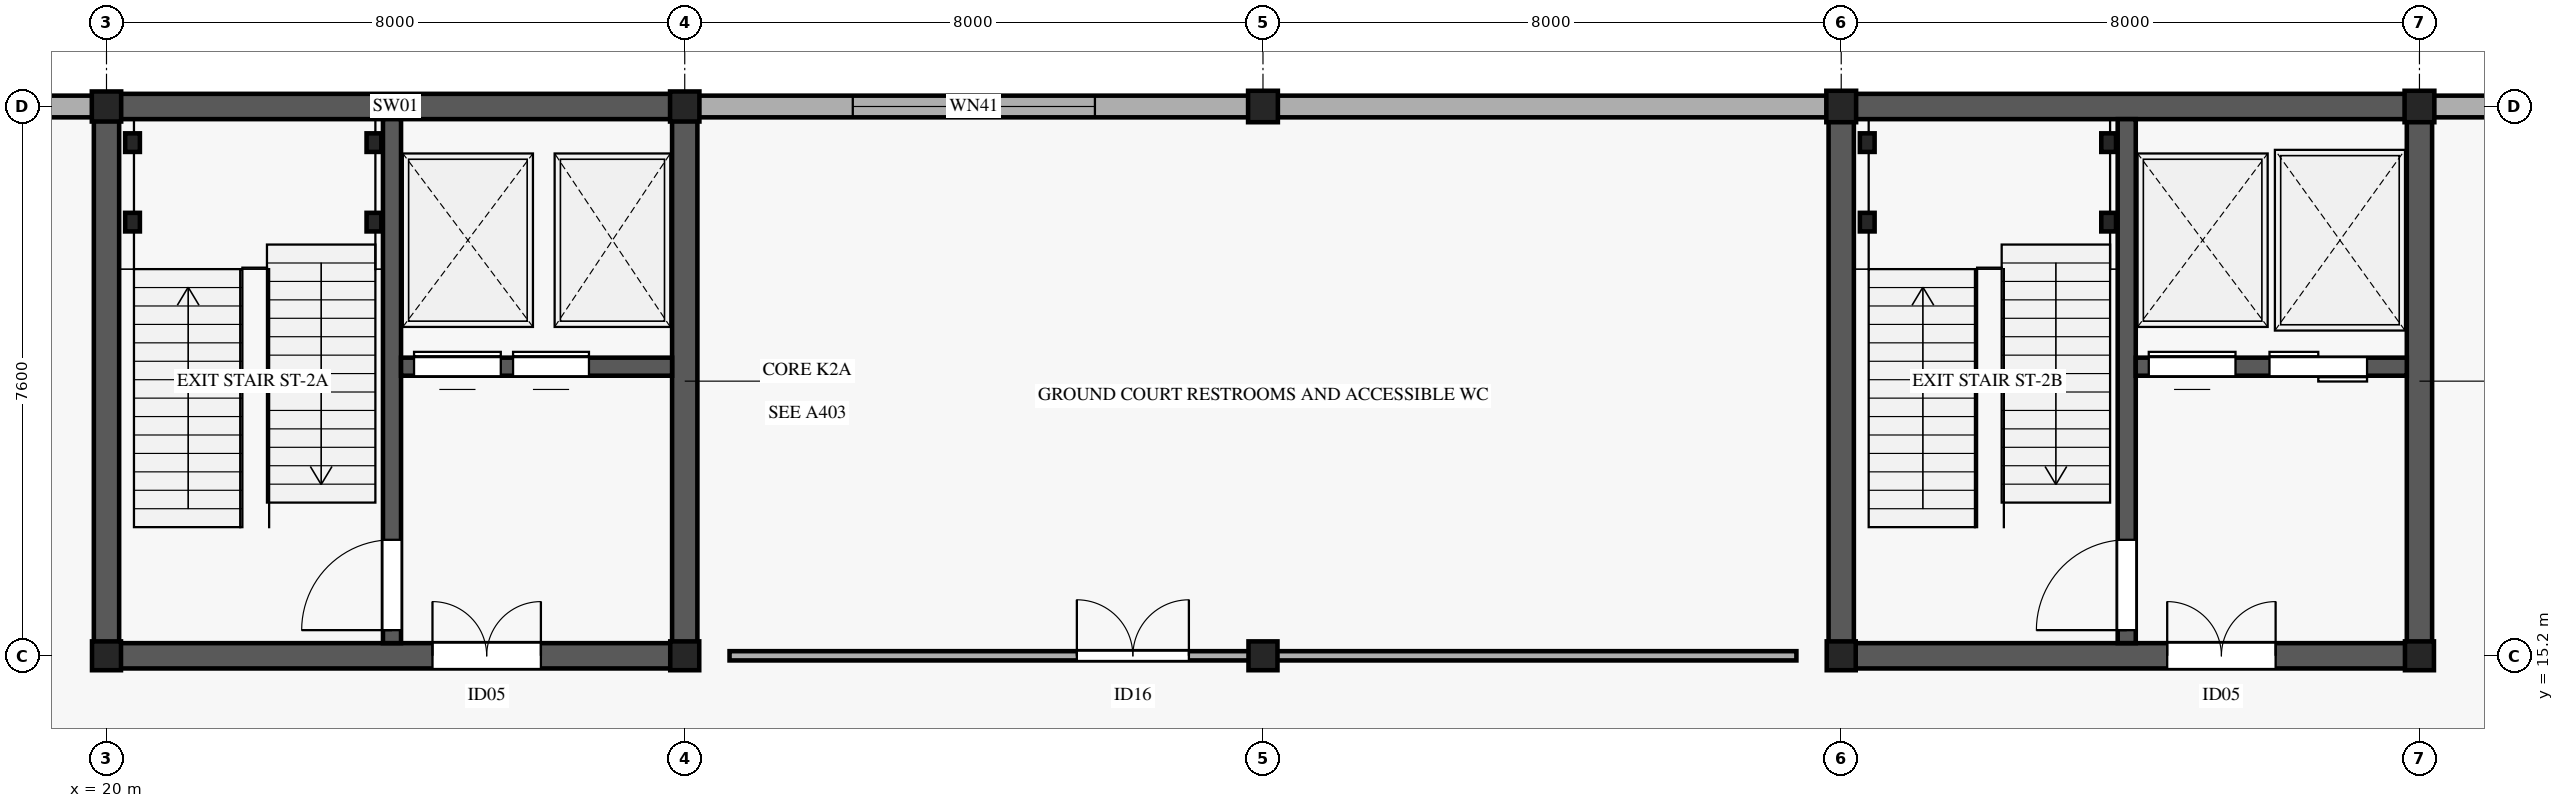
"""IFC4 building model, lengths in metres.
Left out: names, types, materials, properties, quantities, classifications, styles, units other than length and angle.
Written with IfcOpenShell. Run it as: python <this file> out.ifc"""

import sys

from ifc_helpers import new_model, si_unit, direction, frame, frame_2d, origin, origin_2d, place, context, subcontext, project, spatial, rectangle, i_section, extrude, element, fill, save


model = new_model("IFC4")
c1 = context("Model", 3, precision=1e-05, world=origin(), true_north=direction((0.0, 1.0)))
c2 = subcontext(c1, "Body", "Model", "MODEL_VIEW")
j1 = project(units=[si_unit("LENGTHUNIT", "METRE"), si_unit("PLANEANGLEUNIT", "RADIAN")], contexts=[c1])
p1 = place(None, origin())
s1 = spatial("IfcSite", under=j1, at=p1, CompositionType="ELEMENT")
p2 = place(p1, origin())
s2 = spatial("IfcBuilding", under=s1, at=p2, CompositionType="ELEMENT")
p3 = place(p2, origin())
s3 = spatial("IfcBuildingStorey", under=s2, at=p3, CompositionType="ELEMENT", Elevation=0.0)
p4 = place(p3, frame((20.0, 15.2, 0.0), z_axis=(0.0, 0.0, 1.0), x_axis=(1.0, 0.0, 0.0)))
e1 = element("IfcColumn", 1, at=p4, inside=s3, PredefinedType="COLUMN", context=c2, shape_type="SweptSolid", body=[
    extrude(i_section(OverallWidth=0.401, OverallDepth=0.399, WebThickness=0.025, FlangeThickness=0.04, FilletRadius=0.015, at=origin_2d()), origin(), (0.0, 0.0, 1.0), 5.185),
])
p5 = place(p3, frame((20.0, 22.8, 0.0), z_axis=(0.0, 0.0, 1.0), x_axis=(1.0, 0.0, 0.0)))
e2 = element("IfcColumn", 2, at=p5, inside=s3, PredefinedType="COLUMN", context=c2, shape_type="SweptSolid", body=[
    extrude(i_section(OverallWidth=0.406, OverallDepth=0.416, WebThickness=0.03, FlangeThickness=0.048, FilletRadius=0.015, at=origin_2d()), origin(), (0.0, 0.0, 1.0), 5.185),
])
p6 = place(p3, frame((28.0, 15.2, 0.0), z_axis=(0.0, 0.0, 1.0), x_axis=(1.0, 0.0, 0.0)))
e3 = element("IfcColumn", 3, at=p6, inside=s3, PredefinedType="COLUMN", context=c2, shape_type="SweptSolid", body=[
    extrude(i_section(OverallWidth=0.401, OverallDepth=0.399, WebThickness=0.025, FlangeThickness=0.04, FilletRadius=0.015, at=origin_2d()), origin(), (0.0, 0.0, 1.0), 5.185),
])
p7 = place(p3, frame((28.0, 22.8, 0.0), z_axis=(0.0, 0.0, 1.0), x_axis=(1.0, 0.0, 0.0)))
e4 = element("IfcColumn", 4, at=p7, inside=s3, PredefinedType="COLUMN", context=c2, shape_type="SweptSolid", body=[
    extrude(i_section(OverallWidth=0.406, OverallDepth=0.416, WebThickness=0.03, FlangeThickness=0.048, FilletRadius=0.015, at=origin_2d()), origin(), (0.0, 0.0, 1.0), 5.185),
])
p8 = place(p3, frame((36.0, 15.2, 0.0), z_axis=(0.0, 0.0, 1.0), x_axis=(1.0, 0.0, 0.0)))
e5 = element("IfcColumn", 5, at=p8, inside=s3, PredefinedType="COLUMN", context=c2, shape_type="SweptSolid", body=[
    extrude(i_section(OverallWidth=0.401, OverallDepth=0.399, WebThickness=0.025, FlangeThickness=0.04, FilletRadius=0.015, at=origin_2d()), origin(), (0.0, 0.0, 1.0), 5.185),
])
p9 = place(p3, frame((36.0, 22.8, 0.0), z_axis=(0.0, 0.0, 1.0), x_axis=(1.0, 0.0, 0.0)))
e6 = element("IfcColumn", 6, at=p9, inside=s3, PredefinedType="COLUMN", context=c2, shape_type="SweptSolid", body=[
    extrude(i_section(OverallWidth=0.412, OverallDepth=0.435, WebThickness=0.036, FlangeThickness=0.057, FilletRadius=0.015, at=origin_2d()), origin(), (0.0, 0.0, 1.0), 5.185),
])
p10 = place(p3, frame((44.0, 15.2, 0.0), z_axis=(0.0, 0.0, 1.0), x_axis=(1.0, 0.0, 0.0)))
e7 = element("IfcColumn", 7, at=p10, inside=s3, PredefinedType="COLUMN", context=c2, shape_type="SweptSolid", body=[
    extrude(i_section(OverallWidth=0.401, OverallDepth=0.399, WebThickness=0.025, FlangeThickness=0.04, FilletRadius=0.015, at=origin_2d()), origin(), (0.0, 0.0, 1.0), 5.185),
])
p11 = place(p3, frame((44.0, 22.8, 0.0), z_axis=(0.0, 0.0, 1.0), x_axis=(1.0, 0.0, 0.0)))
e8 = element("IfcColumn", 8, at=p11, inside=s3, PredefinedType="COLUMN", context=c2, shape_type="SweptSolid", body=[
    extrude(i_section(OverallWidth=0.412, OverallDepth=0.435, WebThickness=0.036, FlangeThickness=0.057, FilletRadius=0.015, at=origin_2d()), origin(), (0.0, 0.0, 1.0), 5.185),
])
p12 = place(p3, frame((52.0, 15.2, 0.0), z_axis=(0.0, 0.0, 1.0), x_axis=(1.0, 0.0, 0.0)))
e9 = element("IfcColumn", 9, at=p12, inside=s3, PredefinedType="COLUMN", context=c2, shape_type="SweptSolid", body=[
    extrude(i_section(OverallWidth=0.401, OverallDepth=0.399, WebThickness=0.025, FlangeThickness=0.04, FilletRadius=0.015, at=origin_2d()), origin(), (0.0, 0.0, 1.0), 5.185),
])
p13 = place(p3, frame((52.0, 22.8, 0.0), z_axis=(0.0, 0.0, 1.0), x_axis=(1.0, 0.0, 0.0)))
e10 = element("IfcColumn", 10, at=p13, inside=s3, PredefinedType="COLUMN", context=c2, shape_type="SweptSolid", body=[
    extrude(i_section(OverallWidth=0.412, OverallDepth=0.435, WebThickness=0.036, FlangeThickness=0.057, FilletRadius=0.015, at=origin_2d()), origin(), (0.0, 0.0, 1.0), 5.185),
])
p14 = place(p3, frame((11.98, 22.8, 0.0), z_axis=(0.0, 0.0, 1.0), x_axis=(1.0, 0.0, 0.0)))
e11 = element("IfcWall", 11, at=p14, inside=s3, PredefinedType="STANDARD", context=c2, shape_type="SweptSolid", body=[
    extrude(rectangle(XDim=8.04, YDim=0.3, at=frame_2d((4.02, 0.0))), origin(), (0.0, 0.0, 1.0), 4.25),
])
p15 = place(p3, frame((27.98, 22.8, 0.0), z_axis=(0.0, 0.0, 1.0), x_axis=(1.0, 0.0, 0.0)))
e12 = element("IfcWall", 12, at=p15, inside=s3, PredefinedType="STANDARD", context=c2, shape_type="SweptSolid", body=[
    extrude(rectangle(XDim=8.04, YDim=0.3, at=frame_2d((4.02, 0.0))), origin(), (0.0, 0.0, 1.0), 4.25),
])
p16 = place(p15, frame((2.345, 0.0, 0.75)))
e13 = element("IfcOpeningElement", 13, at=p16, cuts=e12, PredefinedType="OPENING", context=c2, shape_type="SweptSolid", body=[
    extrude(rectangle(XDim=3.35, YDim=1.9, at=frame_2d((1.675, 0.95))), frame((0.0, 0.16, 0.0), z_axis=(0.0, -1.0, 0.0), x_axis=(1.0, 0.0, 0.0)), (0.0, 0.0, 1.0), 0.32),
])
p17 = place(p3, frame((35.98, 22.8, 0.0), z_axis=(0.0, 0.0, 1.0), x_axis=(1.0, 0.0, 0.0)))
e14 = element("IfcWall", 14, at=p17, inside=s3, PredefinedType="STANDARD", context=c2, shape_type="SweptSolid", body=[
    extrude(rectangle(XDim=8.04, YDim=0.3, at=frame_2d((4.02, 0.0))), origin(), (0.0, 0.0, 1.0), 4.25),
])
p18 = place(p3, frame((51.98, 22.8, 0.0), z_axis=(0.0, 0.0, 1.0), x_axis=(1.0, 0.0, 0.0)))
e15 = element("IfcWall", 15, at=p18, inside=s3, PredefinedType="STANDARD", context=c2, shape_type="SweptSolid", body=[
    extrude(rectangle(XDim=8.04, YDim=0.3, at=frame_2d((4.02, 0.0))), origin(), (0.0, 0.0, 1.0), 4.25),
])
p19 = place(p18, frame((3.32, 0.0, 0.75)))
e16 = element("IfcOpeningElement", 16, at=p19, cuts=e15, PredefinedType="OPENING", context=c2, shape_type="SweptSolid", body=[
    extrude(rectangle(XDim=1.4, YDim=1.65, at=frame_2d((0.7, 0.825))), frame((0.0, 0.16, 0.0), z_axis=(0.0, -1.0, 0.0), x_axis=(1.0, 0.0, 0.0)), (0.0, 0.0, 1.0), 0.32),
])
p20 = place(p3, frame((19.825, 15.2, 0.0), z_axis=(0.0, 0.0, 1.0), x_axis=(1.0, 0.0, 0.0)))
e17 = element("IfcWall", 17, at=p20, inside=s3, PredefinedType="SHEAR", context=c2, shape_type="SweptSolid", body=[
    extrude(rectangle(XDim=8.35, YDim=0.35, at=frame_2d((4.175, 0.0))), origin(), (0.0, 0.0, 1.0), 5.19),
])
p21 = place(p20, frame((4.685, 0.0, 0.0)))
e18 = element("IfcOpeningElement", 18, at=p21, cuts=e17, PredefinedType="OPENING", context=c2, shape_type="SweptSolid", body=[
    extrude(rectangle(XDim=1.5, YDim=2.2, at=frame_2d((0.75, 1.1))), frame((0.0, 0.185, 0.0), z_axis=(0.0, -1.0, 0.0), x_axis=(1.0, 0.0, 0.0)), (0.0, 0.0, 1.0), 0.37),
])
p22 = place(p3, frame((19.825, 22.8, 0.0), z_axis=(0.0, 0.0, 1.0), x_axis=(1.0, 0.0, 0.0)))
e19 = element("IfcWall", 19, at=p22, inside=s3, PredefinedType="SHEAR", context=c2, shape_type="SweptSolid", body=[
    extrude(rectangle(XDim=8.35, YDim=0.35, at=frame_2d((4.175, 0.0))), origin(), (0.0, 0.0, 1.0), 5.19),
])
for number, where, z_axis, x_axis in (
    (20, (20.0, 15.375, 0.0), (0.0, 0.0, 1.0), (0.0, 1.0, 0.0)),
    (21, (28.0, 15.375, 0.0), (0.0, 0.0, 1.0), (0.0, 1.0, 0.0)),
):
    element("IfcWall", number, at=place(p3, frame(where, z_axis=z_axis, x_axis=x_axis)), inside=s3, PredefinedType="SHEAR", context=c2, shape_type="SweptSolid", body=[
        extrude(rectangle(XDim=7.25, YDim=0.35, at=frame_2d((3.625, 0.0))), origin(), (0.0, 0.0, 1.0), 5.19),
    ])
p23 = place(p3, frame((23.95, 15.375, 0.0), z_axis=(0.0, 0.0, 1.0), x_axis=(0.0, 1.0, 0.0)))
e22 = element("IfcWall", 22, at=p23, inside=s3, PredefinedType="SHEAR", context=c2, shape_type="SweptSolid", body=[
    extrude(rectangle(XDim=7.25, YDim=0.25, at=frame_2d((3.625, 0.0))), origin(), (0.0, 0.0, 1.0), 5.19),
])
p24 = place(p23, frame((0.18, 0.0, 0.0)))
e23 = element("IfcOpeningElement", 23, at=p24, cuts=e22, PredefinedType="OPENING", context=c2, shape_type="SweptSolid", body=[
    extrude(rectangle(XDim=1.25, YDim=2.2, at=frame_2d((0.625, 1.1))), frame((0.0, 0.135, 0.0), z_axis=(0.0, -1.0, 0.0), x_axis=(1.0, 0.0, 0.0)), (0.0, 0.0, 1.0), 0.27),
])
p25 = place(p3, frame((24.075, 19.2, 0.0), z_axis=(0.0, 0.0, 1.0), x_axis=(1.0, 0.0, 0.0)))
e24 = element("IfcWall", 24, at=p25, inside=s3, PredefinedType="SHEAR", context=c2, shape_type="SweptSolid", body=[
    extrude(rectangle(XDim=3.75, YDim=0.25, at=frame_2d((1.875, 0.0))), origin(), (0.0, 0.0, 1.0), 5.19),
])
p26 = place(p25, frame((0.18, 0.0, 0.0)))
e25 = element("IfcOpeningElement", 25, at=p26, cuts=e24, PredefinedType="OPENING", context=c2, shape_type="SweptSolid", body=[
    extrude(rectangle(XDim=1.2, YDim=2.2, at=frame_2d((0.6, 1.1))), frame((0.0, 0.135, 0.0), z_axis=(0.0, -1.0, 0.0), x_axis=(1.0, 0.0, 0.0)), (0.0, 0.0, 1.0), 0.27),
])
p27 = place(p25, frame((1.55, 0.0, 0.0)))
e26 = element("IfcOpeningElement", 26, at=p27, cuts=e24, PredefinedType="OPENING", context=c2, shape_type="SweptSolid", body=[
    extrude(rectangle(XDim=1.05, YDim=2.2, at=frame_2d((0.525, 1.1))), frame((0.0, 0.135, 0.0), z_axis=(0.0, -1.0, 0.0), x_axis=(1.0, 0.0, 0.0)), (0.0, 0.0, 1.0), 0.27),
])
for number, where, z_axis, x_axis in (
    (27, (20.36, 21.2, -0.23), (0.0, 0.0, 1.0), (1.0, 0.0, 0.0)),
    (28, (23.7, 21.2, -0.23), (0.0, 0.0, 1.0), (1.0, 0.0, 0.0)),
    (29, (20.36, 22.3, -0.23), (0.0, 0.0, 1.0), (1.0, 0.0, 0.0)),
    (30, (23.7, 22.3, -0.23), (0.0, 0.0, 1.0), (1.0, 0.0, 0.0)),
):
    element("IfcColumn", number, at=place(p3, frame(where, z_axis=z_axis, x_axis=x_axis)), inside=s3, PredefinedType="COLUMN", context=c2, shape_type="SweptSolid", body=[
        extrude(i_section(OverallWidth=0.204, OverallDepth=0.257, WebThickness=0.009, FlangeThickness=0.016, FilletRadius=0.013, at=origin_2d()), origin(), (0.0, 0.0, 1.0), 5.625),
    ])
p28 = place(p3, frame((43.825, 15.2, 0.0), z_axis=(0.0, 0.0, 1.0), x_axis=(1.0, 0.0, 0.0)))
e31 = element("IfcWall", 31, at=p28, inside=s3, PredefinedType="SHEAR", context=c2, shape_type="SweptSolid", body=[
    extrude(rectangle(XDim=8.35, YDim=0.35, at=frame_2d((4.175, 0.0))), origin(), (0.0, 0.0, 1.0), 5.19),
])
p29 = place(p28, frame((4.685, 0.0, 0.0)))
e32 = element("IfcOpeningElement", 32, at=p29, cuts=e31, PredefinedType="OPENING", context=c2, shape_type="SweptSolid", body=[
    extrude(rectangle(XDim=1.5, YDim=2.2, at=frame_2d((0.75, 1.1))), frame((0.0, 0.185, 0.0), z_axis=(0.0, -1.0, 0.0), x_axis=(1.0, 0.0, 0.0)), (0.0, 0.0, 1.0), 0.37),
])
p30 = place(p3, frame((43.825, 22.8, 0.0), z_axis=(0.0, 0.0, 1.0), x_axis=(1.0, 0.0, 0.0)))
e33 = element("IfcWall", 33, at=p30, inside=s3, PredefinedType="SHEAR", context=c2, shape_type="SweptSolid", body=[
    extrude(rectangle(XDim=8.35, YDim=0.35, at=frame_2d((4.175, 0.0))), origin(), (0.0, 0.0, 1.0), 5.19),
])
for number, where, z_axis, x_axis in (
    (34, (44.0, 15.375, 0.0), (0.0, 0.0, 1.0), (0.0, 1.0, 0.0)),
    (35, (52.0, 15.375, 0.0), (0.0, 0.0, 1.0), (0.0, 1.0, 0.0)),
):
    element("IfcWall", number, at=place(p3, frame(where, z_axis=z_axis, x_axis=x_axis)), inside=s3, PredefinedType="SHEAR", context=c2, shape_type="SweptSolid", body=[
        extrude(rectangle(XDim=7.25, YDim=0.35, at=frame_2d((3.625, 0.0))), origin(), (0.0, 0.0, 1.0), 5.19),
    ])
p31 = place(p3, frame((47.95, 15.375, 0.0), z_axis=(0.0, 0.0, 1.0), x_axis=(0.0, 1.0, 0.0)))
e36 = element("IfcWall", 36, at=p31, inside=s3, PredefinedType="SHEAR", context=c2, shape_type="SweptSolid", body=[
    extrude(rectangle(XDim=7.25, YDim=0.25, at=frame_2d((3.625, 0.0))), origin(), (0.0, 0.0, 1.0), 5.19),
])
p32 = place(p31, frame((0.18, 0.0, 0.0)))
e37 = element("IfcOpeningElement", 37, at=p32, cuts=e36, PredefinedType="OPENING", context=c2, shape_type="SweptSolid", body=[
    extrude(rectangle(XDim=1.25, YDim=2.2, at=frame_2d((0.625, 1.1))), frame((0.0, 0.135, 0.0), z_axis=(0.0, -1.0, 0.0), x_axis=(1.0, 0.0, 0.0)), (0.0, 0.0, 1.0), 0.27),
])
p33 = place(p3, frame((48.075, 19.2, 0.0), z_axis=(0.0, 0.0, 1.0), x_axis=(1.0, 0.0, 0.0)))
e38 = element("IfcWall", 38, at=p33, inside=s3, PredefinedType="SHEAR", context=c2, shape_type="SweptSolid", body=[
    extrude(rectangle(XDim=3.75, YDim=0.25, at=frame_2d((1.875, 0.0))), origin(), (0.0, 0.0, 1.0), 5.19),
])
p34 = place(p33, frame((0.18, 0.0, 0.0)))
e39 = element("IfcOpeningElement", 39, at=p34, cuts=e38, PredefinedType="OPENING", context=c2, shape_type="SweptSolid", body=[
    extrude(rectangle(XDim=1.2, YDim=2.2, at=frame_2d((0.6, 1.1))), frame((0.0, 0.135, 0.0), z_axis=(0.0, -1.0, 0.0), x_axis=(1.0, 0.0, 0.0)), (0.0, 0.0, 1.0), 0.27),
])
p35 = place(p33, frame((1.85, 0.0, 0.0)))
e40 = element("IfcOpeningElement", 40, at=p35, cuts=e38, PredefinedType="OPENING", context=c2, shape_type="SweptSolid", body=[
    extrude(rectangle(XDim=1.35, YDim=2.2, at=frame_2d((0.675, 1.1))), frame((0.0, 0.135, 0.0), z_axis=(0.0, -1.0, 0.0), x_axis=(1.0, 0.0, 0.0)), (0.0, 0.0, 1.0), 0.27),
])
for number, where, z_axis, x_axis in (
    (41, (44.36, 21.2, -0.23), (0.0, 0.0, 1.0), (1.0, 0.0, 0.0)),
    (42, (47.7, 21.2, -0.23), (0.0, 0.0, 1.0), (1.0, 0.0, 0.0)),
    (43, (44.36, 22.3, -0.23), (0.0, 0.0, 1.0), (1.0, 0.0, 0.0)),
    (44, (47.7, 22.3, -0.23), (0.0, 0.0, 1.0), (1.0, 0.0, 0.0)),
):
    element("IfcColumn", number, at=place(p3, frame(where, z_axis=z_axis, x_axis=x_axis)), inside=s3, PredefinedType="COLUMN", context=c2, shape_type="SweptSolid", body=[
        extrude(i_section(OverallWidth=0.204, OverallDepth=0.257, WebThickness=0.009, FlangeThickness=0.016, FilletRadius=0.013, at=origin_2d()), origin(), (0.0, 0.0, 1.0), 5.625),
    ])
p36 = place(p3, frame((28.62, 15.2, 0.0), z_axis=(0.0, 0.0, 1.0), x_axis=(1.0, 0.0, 0.0)))
e45 = element("IfcWall", 45, at=p36, inside=s3, PredefinedType="PARTITIONING", context=c2, shape_type="SweptSolid", body=[
    extrude(rectangle(XDim=14.76, YDim=0.128, at=frame_2d((7.38, 0.0))), origin(), (0.0, 0.0, 1.0), 4.05),
])
p37 = place(p36, frame((4.805, 0.0, 0.0)))
e46 = element("IfcOpeningElement", 46, at=p37, cuts=e45, PredefinedType="OPENING", context=c2, shape_type="SweptSolid", body=[
    extrude(rectangle(XDim=1.55, YDim=2.3, at=frame_2d((0.775, 1.15))), frame((0.0, 0.074, 0.0), z_axis=(0.0, -1.0, 0.0), x_axis=(1.0, 0.0, 0.0)), (0.0, 0.0, 1.0), 0.148),
])
p38 = place(p16, origin())
e47 = element("IfcWindow", 47, at=p38, inside=s3, PartitioningType="SINGLE_PANEL", PredefinedType="WINDOW", context=c2, shape_type="SweptSolid", body=[
    extrude(rectangle(XDim=3.35, YDim=1.9, at=frame_2d((1.675, 0.95))), frame((0.0, 0.03, 0.0), z_axis=(0.0, -1.0, 0.0), x_axis=(1.0, 0.0, 0.0)), (0.0, 0.0, 1.0), 0.06),
])
fill(e13, e47)
p39 = place(p24, origin())
e48 = element("IfcDoor", 48, at=p39, inside=s3, OperationType="SINGLE_SWING_LEFT", PredefinedType="DOOR", context=c2, shape_type="SweptSolid", body=[
    extrude(rectangle(XDim=1.25, YDim=2.2, at=frame_2d((0.625, 1.1))), frame((0.0, 0.025, 0.0), z_axis=(0.0, -1.0, 0.0), x_axis=(1.0, 0.0, 0.0)), (0.0, 0.0, 1.0), 0.05),
])
fill(e23, e48)
p40 = place(p21, origin())
e49 = element("IfcDoor", 49, at=p40, inside=s3, OperationType="DOUBLE_DOOR_SINGLE_SWING", PredefinedType="DOOR", context=c2, shape_type="SweptSolid", body=[
    extrude(rectangle(XDim=1.5, YDim=2.2, at=frame_2d((0.75, 1.1))), frame((0.0, 0.025, 0.0), z_axis=(0.0, -1.0, 0.0), x_axis=(1.0, 0.0, 0.0)), (0.0, 0.0, 1.0), 0.05),
])
fill(e18, e49)
p41 = place(p26, origin())
e50 = element("IfcDoor", 50, at=p41, inside=s3, OperationType="SLIDING_TO_LEFT", PredefinedType="DOOR", context=c2, shape_type="SweptSolid", body=[
    extrude(rectangle(XDim=1.2, YDim=2.2, at=frame_2d((0.6, 1.1))), frame((0.0, 0.025, 0.0), z_axis=(0.0, -1.0, 0.0), x_axis=(1.0, 0.0, 0.0)), (0.0, 0.0, 1.0), 0.05),
])
fill(e25, e50)
p42 = place(p27, origin())
e51 = element("IfcDoor", 51, at=p42, inside=s3, OperationType="SLIDING_TO_RIGHT", PredefinedType="DOOR", context=c2, shape_type="SweptSolid", body=[
    extrude(rectangle(XDim=1.05, YDim=2.2, at=frame_2d((0.525, 1.1))), frame((0.0, 0.025, 0.0), z_axis=(0.0, -1.0, 0.0), x_axis=(1.0, 0.0, 0.0)), (0.0, 0.0, 1.0), 0.05),
])
fill(e26, e51)
p43 = place(p32, origin())
e52 = element("IfcDoor", 52, at=p43, inside=s3, OperationType="SINGLE_SWING_LEFT", PredefinedType="DOOR", context=c2, shape_type="SweptSolid", body=[
    extrude(rectangle(XDim=1.25, YDim=2.2, at=frame_2d((0.625, 1.1))), frame((0.0, 0.025, 0.0), z_axis=(0.0, -1.0, 0.0), x_axis=(1.0, 0.0, 0.0)), (0.0, 0.0, 1.0), 0.05),
])
fill(e37, e52)
p44 = place(p29, origin())
e53 = element("IfcDoor", 53, at=p44, inside=s3, OperationType="DOUBLE_DOOR_SINGLE_SWING", PredefinedType="DOOR", context=c2, shape_type="SweptSolid", body=[
    extrude(rectangle(XDim=1.5, YDim=2.2, at=frame_2d((0.75, 1.1))), frame((0.0, 0.025, 0.0), z_axis=(0.0, -1.0, 0.0), x_axis=(1.0, 0.0, 0.0)), (0.0, 0.0, 1.0), 0.05),
])
fill(e32, e53)
p45 = place(p34, origin())
e54 = element("IfcDoor", 54, at=p45, inside=s3, OperationType="SLIDING_TO_LEFT", PredefinedType="DOOR", context=c2, shape_type="SweptSolid", body=[
    extrude(rectangle(XDim=1.2, YDim=2.2, at=frame_2d((0.6, 1.1))), frame((0.0, 0.025, 0.0), z_axis=(0.0, -1.0, 0.0), x_axis=(1.0, 0.0, 0.0)), (0.0, 0.0, 1.0), 0.05),
])
fill(e39, e54)
p46 = place(p35, origin())
e55 = element("IfcDoor", 55, at=p46, inside=s3, OperationType="DOUBLE_DOOR_SLIDING", PredefinedType="DOOR", context=c2, shape_type="SweptSolid", body=[
    extrude(rectangle(XDim=1.35, YDim=2.2, at=frame_2d((0.675, 1.1))), frame((0.0, 0.025, 0.0), z_axis=(0.0, -1.0, 0.0), x_axis=(1.0, 0.0, 0.0)), (0.0, 0.0, 1.0), 0.05),
])
fill(e40, e55)
p47 = place(p37, origin())
e56 = element("IfcDoor", 56, at=p47, inside=s3, OperationType="DOUBLE_DOOR_SINGLE_SWING", PredefinedType="DOOR", context=c2, shape_type="SweptSolid", body=[
    extrude(rectangle(XDim=1.55, YDim=2.3, at=frame_2d((0.775, 1.15))), frame((0.0, 0.025, 0.0), z_axis=(0.0, -1.0, 0.0), x_axis=(1.0, 0.0, 0.0)), (0.0, 0.0, 1.0), 0.05),
])
fill(e46, e56)
save(model, sys.argv[1])
